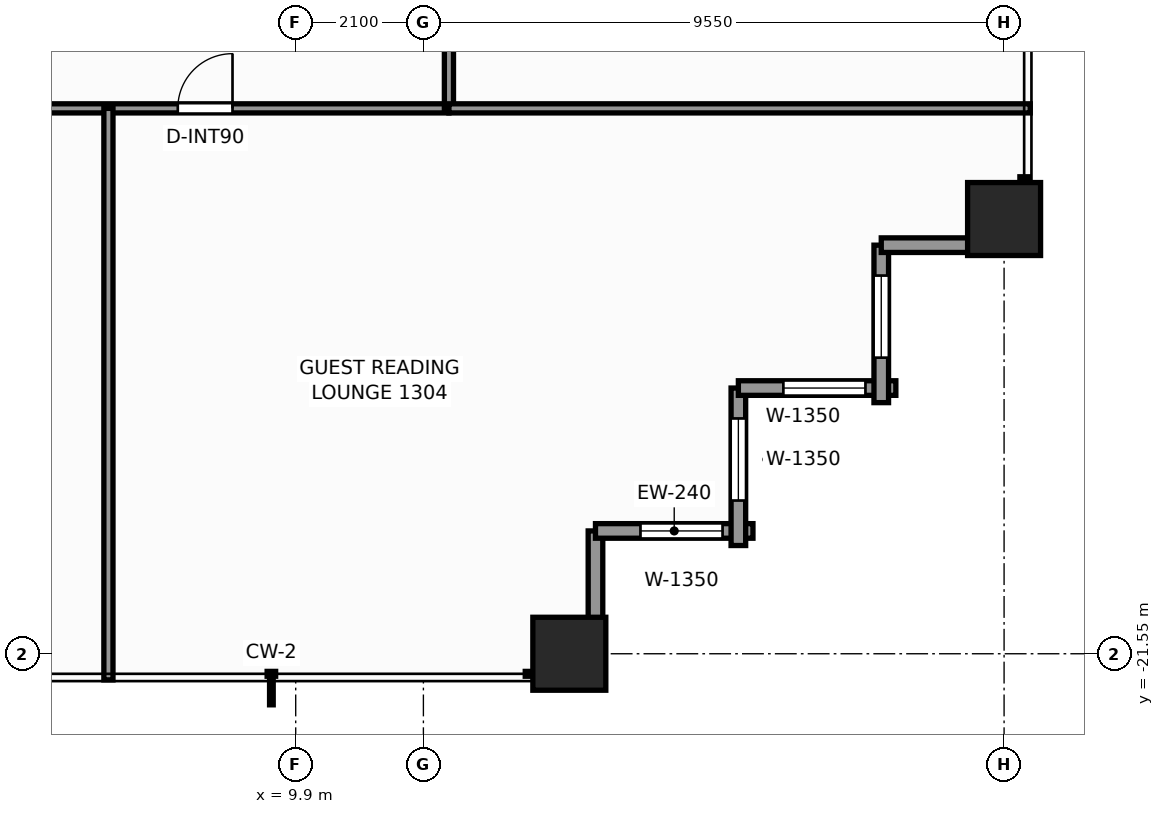
"""IFC4 building model, lengths in metres.
Left out: names, types, materials, properties, quantities, classifications, styles, units other than length and angle.
Written with IfcOpenShell. Run it as: python <this file> out.ifc"""

import sys

from ifc_helpers import new_model, si_unit, direction, frame, frame_2d, origin, origin_2d, place, context, subcontext, project, spatial, rectangle, extrude, element, fill, save


model = new_model("IFC4")
c1 = context("Model", 3, precision=1e-05, world=origin(), true_north=direction((0.0, 1.0)))
c2 = subcontext(c1, "Body", "Model", "MODEL_VIEW")
j1 = project(units=[si_unit("LENGTHUNIT", "METRE"), si_unit("PLANEANGLEUNIT", "RADIAN")], contexts=[c1])
p1 = place(None, origin())
s1 = spatial("IfcSite", under=j1, at=p1, CompositionType="ELEMENT")
p2 = place(p1, origin())
s2 = spatial("IfcBuilding", under=s1, at=p2, CompositionType="ELEMENT")
p3 = place(p2, frame((0.0, 0.0, 46.9)))
s3 = spatial("IfcBuildingStorey", under=s2, at=p3, CompositionType="ELEMENT", Elevation=46.9)
for number, where, z_axis, x_axis in (
    (1, (14.4, -21.55, 0.0), (0.0, 0.0, 1.0), (1.0, 0.0, 0.0)),
    (2, (21.55, -14.4, 0.0), (0.0, 0.0, 1.0), (1.0, 0.0, 0.0)),
):
    element("IfcColumn", number, at=place(p3, frame(where, z_axis=z_axis, x_axis=x_axis)), inside=s3, PredefinedType="COLUMN", context=c2, shape_type="SweptSolid", body=[
        extrude(rectangle(XDim=1.2, YDim=1.2, at=origin_2d()), origin(), (0.0, 0.0, 1.0), 3.3),
    ])
p4 = place(p3, frame((14.83, -19.53, 0.0), z_axis=(0.0, 0.0, 1.0), x_axis=(0.0, -1.0, 0.0)))
e3 = element("IfcWall", 3, at=p4, inside=s3, PredefinedType="STANDARD", context=c2, shape_type="SweptSolid", body=[
    extrude(rectangle(XDim=2.59, YDim=0.24, at=frame_2d((1.295, 0.0))), origin(), (0.0, 0.0, 1.0), 2.439),
])
p5 = place(p3, frame((17.42, -19.53, 0.0), z_axis=(0.0, 0.0, 1.0), x_axis=(-1.0, 0.0, 0.0)))
e4 = element("IfcWall", 4, at=p5, inside=s3, PredefinedType="STANDARD", context=c2, shape_type="SweptSolid", body=[
    extrude(rectangle(XDim=2.59, YDim=0.24, at=frame_2d((1.295, 0.0))), origin(), (0.0, 0.0, 1.0), 2.439),
])
p6 = place(p5, frame((0.5, 0.0, 0.65)))
e5 = element("IfcOpeningElement", 5, at=p6, cuts=e4, PredefinedType="OPENING", context=c2, shape_type="SweptSolid", body=[
    extrude(rectangle(XDim=1.35, YDim=1.55, at=frame_2d((0.675, 0.775))), frame((0.0, 0.13, 0.0), z_axis=(0.0, -1.0, 0.0), x_axis=(1.0, 0.0, 0.0)), (0.0, 0.0, 1.0), 0.26),
])
p7 = place(p3, frame((17.18, -17.18, 0.0), z_axis=(0.0, 0.0, 1.0), x_axis=(0.0, -1.0, 0.0)))
e6 = element("IfcWall", 6, at=p7, inside=s3, PredefinedType="STANDARD", context=c2, shape_type="SweptSolid", body=[
    extrude(rectangle(XDim=2.59, YDim=0.24, at=frame_2d((1.295, 0.0))), origin(), (0.0, 0.0, 1.0), 2.439),
])
p8 = place(p7, frame((0.5, 0.0, 0.65)))
e7 = element("IfcOpeningElement", 7, at=p8, cuts=e6, PredefinedType="OPENING", context=c2, shape_type="SweptSolid", body=[
    extrude(rectangle(XDim=1.35, YDim=1.55, at=frame_2d((0.675, 0.775))), frame((0.0, 0.13, 0.0), z_axis=(0.0, -1.0, 0.0), x_axis=(1.0, 0.0, 0.0)), (0.0, 0.0, 1.0), 0.26),
])
p9 = place(p3, frame((19.77, -17.18, 0.0), z_axis=(0.0, 0.0, 1.0), x_axis=(-1.0, 0.0, 0.0)))
e8 = element("IfcWall", 8, at=p9, inside=s3, PredefinedType="STANDARD", context=c2, shape_type="SweptSolid", body=[
    extrude(rectangle(XDim=2.59, YDim=0.24, at=frame_2d((1.295, 0.0))), origin(), (0.0, 0.0, 1.0), 2.439),
])
p10 = place(p9, frame((0.5, 0.0, 0.65)))
e9 = element("IfcOpeningElement", 9, at=p10, cuts=e8, PredefinedType="OPENING", context=c2, shape_type="SweptSolid", body=[
    extrude(rectangle(XDim=1.35, YDim=1.55, at=frame_2d((0.675, 0.775))), frame((0.0, 0.13, 0.0), z_axis=(0.0, -1.0, 0.0), x_axis=(1.0, 0.0, 0.0)), (0.0, 0.0, 1.0), 0.26),
])
p11 = place(p3, frame((19.53, -14.83, 0.0), z_axis=(0.0, 0.0, 1.0), x_axis=(0.0, -1.0, 0.0)))
e10 = element("IfcWall", 10, at=p11, inside=s3, PredefinedType="STANDARD", context=c2, shape_type="SweptSolid", body=[
    extrude(rectangle(XDim=2.59, YDim=0.24, at=frame_2d((1.295, 0.0))), origin(), (0.0, 0.0, 1.0), 2.439),
])
p12 = place(p11, frame((0.5, 0.0, 0.65)))
e11 = element("IfcOpeningElement", 11, at=p12, cuts=e10, PredefinedType="OPENING", context=c2, shape_type="SweptSolid", body=[
    extrude(rectangle(XDim=1.35, YDim=1.55, at=frame_2d((0.675, 0.775))), frame((0.0, 0.13, 0.0), z_axis=(0.0, -1.0, 0.0), x_axis=(1.0, 0.0, 0.0)), (0.0, 0.0, 1.0), 0.26),
])
p13 = place(p3, frame((22.12, -14.83, 0.0), z_axis=(0.0, 0.0, 1.0), x_axis=(-1.0, 0.0, 0.0)))
e12 = element("IfcWall", 12, at=p13, inside=s3, PredefinedType="STANDARD", context=c2, shape_type="SweptSolid", body=[
    extrude(rectangle(XDim=2.59, YDim=0.24, at=frame_2d((1.295, 0.0))), origin(), (0.0, 0.0, 1.0), 2.439),
])
p14 = place(p3, frame((-12.58, -12.58, 0.0), z_axis=(0.0, 0.0, 1.0), x_axis=(1.0, 0.0, 0.0)))
e13 = element("IfcWall", 13, at=p14, inside=s3, PredefinedType="PARTITIONING", context=c2, shape_type="SweptSolid", body=[
    extrude(rectangle(XDim=25.0, YDim=0.15, at=frame_2d((12.5, 0.0))), origin(), (0.0, 0.0, 1.0), 2.272),
])
p15 = place(p14, frame((3.118, 0.0, 0.0)))
e14 = element("IfcOpeningElement", 14, at=p15, cuts=e13, PredefinedType="OPENING", context=c2, shape_type="SweptSolid", body=[
    extrude(rectangle(XDim=0.9, YDim=2.06, at=frame_2d((0.45, 1.03))), frame((0.0, 0.085, 0.0), z_axis=(0.0, -1.0, 0.0), x_axis=(1.0, 0.0, 0.0)), (0.0, 0.0, 1.0), 0.17),
])
p16 = place(p14, frame((5.454, 0.0, 0.0)))
e15 = element("IfcOpeningElement", 15, at=p16, cuts=e13, PredefinedType="OPENING", context=c2, shape_type="SweptSolid", body=[
    extrude(rectangle(XDim=0.9, YDim=2.06, at=frame_2d((0.45, 1.03))), frame((0.0, 0.085, 0.0), z_axis=(0.0, -1.0, 0.0), x_axis=(1.0, 0.0, 0.0)), (0.0, 0.0, 1.0), 0.17),
])
p17 = place(p14, frame((14.16, 0.0, 0.0)))
e16 = element("IfcOpeningElement", 16, at=p17, cuts=e13, PredefinedType="OPENING", context=c2, shape_type="SweptSolid", body=[
    extrude(rectangle(XDim=0.9, YDim=2.06, at=frame_2d((0.45, 1.03))), frame((0.0, 0.085, 0.0), z_axis=(0.0, -1.0, 0.0), x_axis=(1.0, 0.0, 0.0)), (0.0, 0.0, 1.0), 0.17),
])
p18 = place(p14, frame((20.541, 0.0, 0.0)))
e17 = element("IfcOpeningElement", 17, at=p18, cuts=e13, PredefinedType="OPENING", context=c2, shape_type="SweptSolid", body=[
    extrude(rectangle(XDim=0.9, YDim=2.06, at=frame_2d((0.45, 1.03))), frame((0.0, 0.085, 0.0), z_axis=(0.0, -1.0, 0.0), x_axis=(1.0, 0.0, 0.0)), (0.0, 0.0, 1.0), 0.17),
])
p19 = place(p3, frame((12.42, -12.58, 0.0), z_axis=(0.0, 0.0, 1.0), x_axis=(0.0, 1.0, 0.0)))
e18 = element("IfcWall", 18, at=p19, inside=s3, PredefinedType="PARTITIONING", context=c2, shape_type="SweptSolid", body=[
    extrude(rectangle(XDim=24.84, YDim=0.15, at=frame_2d((12.42, 0.0))), origin(), (0.0, 0.0, 1.0), 2.272),
])
p20 = place(p19, frame((4.595, 0.0, 0.0)))
e19 = element("IfcOpeningElement", 19, at=p20, cuts=e18, PredefinedType="OPENING", context=c2, shape_type="SweptSolid", body=[
    extrude(rectangle(XDim=0.9, YDim=2.06, at=frame_2d((0.45, 1.03))), frame((0.0, 0.085, 0.0), z_axis=(0.0, -1.0, 0.0), x_axis=(1.0, 0.0, 0.0)), (0.0, 0.0, 1.0), 0.17),
])
p21 = place(p19, frame((14.16, 0.0, 0.0)))
e20 = element("IfcOpeningElement", 20, at=p21, cuts=e18, PredefinedType="OPENING", context=c2, shape_type="SweptSolid", body=[
    extrude(rectangle(XDim=0.9, YDim=2.06, at=frame_2d((0.45, 1.03))), frame((0.0, 0.085, 0.0), z_axis=(0.0, -1.0, 0.0), x_axis=(1.0, 0.0, 0.0)), (0.0, 0.0, 1.0), 0.17),
])
p22 = place(p19, frame((20.309, 0.0, 0.0)))
e21 = element("IfcOpeningElement", 21, at=p22, cuts=e18, PredefinedType="OPENING", context=c2, shape_type="SweptSolid", body=[
    extrude(rectangle(XDim=0.95, YDim=2.06, at=frame_2d((0.475, 1.03))), frame((0.0, 0.085, 0.0), z_axis=(0.0, -1.0, 0.0), x_axis=(1.0, 0.0, 0.0)), (0.0, 0.0, 1.0), 0.17),
])
p23 = place(p3, frame((12.42, -12.58, 0.0), z_axis=(0.0, 0.0, 1.0), x_axis=(1.0, 0.0, 0.0)))
e22 = element("IfcWall", 22, at=p23, inside=s3, PredefinedType="PARTITIONING", context=c2, shape_type="SweptSolid", body=[
    extrude(rectangle(XDim=9.56, YDim=0.15, at=frame_2d((4.78, 0.0))), origin(), (0.0, 0.0, 1.0), 2.272),
])
p24 = place(p3, frame((6.82, -21.98, 0.0), z_axis=(0.0, 0.0, 1.0), x_axis=(0.0, 1.0, 0.0)))
e23 = element("IfcWall", 23, at=p24, inside=s3, PredefinedType="PARTITIONING", context=c2, shape_type="SweptSolid", body=[
    extrude(rectangle(XDim=9.4, YDim=0.15, at=frame_2d((4.7, 0.0))), origin(), (0.0, 0.0, 1.0), 2.429),
])
p25 = place(p6, origin())
e24 = element("IfcWindow", 24, at=p25, inside=s3, PartitioningType="SINGLE_PANEL", PredefinedType="WINDOW", context=c2, shape_type="SweptSolid", body=[
    extrude(rectangle(XDim=1.35, YDim=1.55, at=frame_2d((0.675, 0.775))), frame((0.0, 0.03, 0.0), z_axis=(0.0, -1.0, 0.0), x_axis=(1.0, 0.0, 0.0)), (0.0, 0.0, 1.0), 0.06),
])
fill(e5, e24)
p26 = place(p8, origin())
e25 = element("IfcWindow", 25, at=p26, inside=s3, PartitioningType="SINGLE_PANEL", PredefinedType="WINDOW", context=c2, shape_type="SweptSolid", body=[
    extrude(rectangle(XDim=1.35, YDim=1.55, at=frame_2d((0.675, 0.775))), frame((0.0, 0.03, 0.0), z_axis=(0.0, -1.0, 0.0), x_axis=(1.0, 0.0, 0.0)), (0.0, 0.0, 1.0), 0.06),
])
fill(e7, e25)
p27 = place(p10, origin())
e26 = element("IfcWindow", 26, at=p27, inside=s3, PartitioningType="SINGLE_PANEL", PredefinedType="WINDOW", context=c2, shape_type="SweptSolid", body=[
    extrude(rectangle(XDim=1.35, YDim=1.55, at=frame_2d((0.675, 0.775))), frame((0.0, 0.03, 0.0), z_axis=(0.0, -1.0, 0.0), x_axis=(1.0, 0.0, 0.0)), (0.0, 0.0, 1.0), 0.06),
])
fill(e9, e26)
p28 = place(p12, origin())
e27 = element("IfcWindow", 27, at=p28, inside=s3, PartitioningType="SINGLE_PANEL", PredefinedType="WINDOW", context=c2, shape_type="SweptSolid", body=[
    extrude(rectangle(XDim=1.35, YDim=1.55, at=frame_2d((0.675, 0.775))), frame((0.0, 0.03, 0.0), z_axis=(0.0, -1.0, 0.0), x_axis=(1.0, 0.0, 0.0)), (0.0, 0.0, 1.0), 0.06),
])
fill(e11, e27)
p29 = place(p18, origin())
e28 = element("IfcDoor", 28, at=p29, inside=s3, OperationType="SINGLE_SWING_RIGHT", PredefinedType="DOOR", context=c2, shape_type="SweptSolid", body=[
    extrude(rectangle(XDim=0.9, YDim=2.06, at=frame_2d((0.45, 1.03))), frame((0.0, 0.025, 0.0), z_axis=(0.0, -1.0, 0.0), x_axis=(1.0, 0.0, 0.0)), (0.0, 0.0, 1.0), 0.05),
])
fill(e17, e28)
save(model, sys.argv[1])
